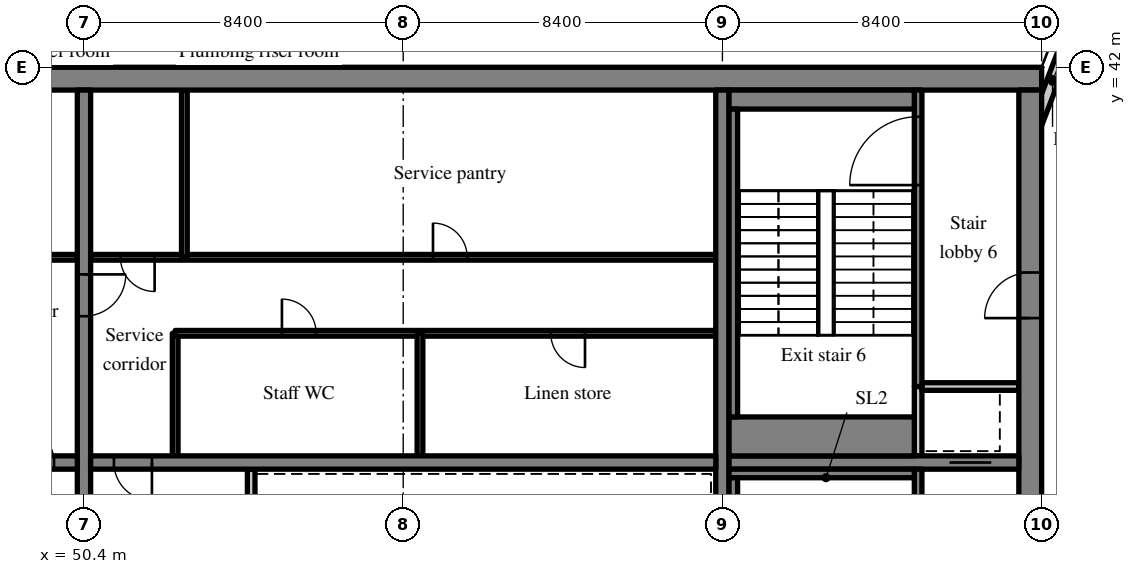
"""IFC4 building model, lengths in metres.
Left out: names, types, materials, properties, quantities, classifications, styles, units other than length and angle.
Written with IfcOpenShell. Run it as: python <this file> out.ifc"""

import sys

from ifc_helpers import new_model, si_unit, direction, frame, frame_2d, origin, place, context, subcontext, project, spatial, rectangle, extrude, source, transform, mapped, element, fill, save


model = new_model("IFC4")
c1 = context("Model", 3, precision=1e-05, world=origin(), true_north=direction((0.0, 1.0)))
c2 = subcontext(c1, "Body", "Model", "MODEL_VIEW")
j1 = project(units=[si_unit("LENGTHUNIT", "METRE"), si_unit("PLANEANGLEUNIT", "RADIAN")], contexts=[c1])
p1 = place(None, origin())
s1 = spatial("IfcSite", under=j1, at=p1, CompositionType="ELEMENT")
p2 = place(p1, origin())
s2 = spatial("IfcBuilding", under=s1, at=p2, CompositionType="ELEMENT")
p3 = place(p2, frame((0.0, 0.0, 249.1)))
s3 = spatial("IfcBuildingStorey", under=s2, at=p3, CompositionType="ELEMENT", Elevation=249.1)
m1 = source(origin(), c2, "Body", "SweptSolid", [
    extrude(rectangle(XDim=50.4, YDim=0.6, at=frame_2d((25.2, 0.0))), origin(), (0.0, 0.0, 1.0), 3.62),
])
p4 = place(p3, frame((25.2, 41.7, 0.0), z_axis=(0.0, 0.0, 1.0), x_axis=(1.0, 0.0, 0.0)))
e1 = element("IfcWall", 1, at=p4, inside=s3, PredefinedType="SHEAR", context=c2, shape_type="MappedRepresentation", body=[
    mapped(m1, transform((0.0, 0.0, 0.0), scale=1.0)),
])
m2 = source(origin(), c2, "Body", "SweptSolid", [
    extrude(rectangle(XDim=18.8, YDim=0.6, at=frame_2d((9.4, 0.0))), origin(), (0.0, 0.0, 1.0), 3.62),
])
p5 = place(p3, frame((75.3, 22.6, 0.0), z_axis=(0.0, 0.0, 1.0), x_axis=(0.0, 1.0, 0.0)))
e2 = element("IfcWall", 2, at=p5, inside=s3, PredefinedType="SHEAR", context=c2, shape_type="MappedRepresentation", body=[
    mapped(m2, transform((0.0, 0.0, 0.0), scale=1.0)),
])
m3 = source(origin(), c2, "Body", "SweptSolid", [
    extrude(rectangle(XDim=1.2, YDim=2.1, at=frame_2d((0.6, 1.05))), frame((0.0, 0.31, 0.0), z_axis=(0.0, -1.0, 0.0), x_axis=(1.0, 0.0, 0.0)), (0.0, 0.0, 1.0), 0.62),
])
p6 = place(p5, frame((12.8, 0.0, 0.0)))
e3 = element("IfcOpeningElement", 3, at=p6, cuts=e2, PredefinedType="OPENING", context=c2, shape_type="MappedRepresentation", body=[
    mapped(m3, transform((0.0, 0.0, 0.0), scale=1.0)),
])
m4 = source(origin(), c2, "Body", "SweptSolid", [
    extrude(rectangle(XDim=18.8, YDim=0.35, at=frame_2d((9.4, 0.0))), origin(), (0.0, 0.0, 1.0), 3.62),
])
p7 = place(p3, frame((50.4, 22.6, 0.0), z_axis=(0.0, 0.0, 1.0), x_axis=(0.0, 1.0, 0.0)))
e4 = element("IfcWall", 4, at=p7, inside=s3, PredefinedType="SHEAR", context=c2, shape_type="MappedRepresentation", body=[
    mapped(m4, transform((0.0, 0.0, 0.0), scale=1.0)),
])
m5 = source(origin(), c2, "Body", "SweptSolid", [
    extrude(rectangle(XDim=1.1, YDim=2.1, at=frame_2d((0.55, 1.05))), frame((0.0, 0.185, 0.0), z_axis=(0.0, -1.0, 0.0), x_axis=(1.0, 0.0, 0.0)), (0.0, 0.0, 1.0), 0.37),
])
p8 = place(p7, frame((12.85, 0.0, 0.0)))
e5 = element("IfcOpeningElement", 5, at=p8, cuts=e4, PredefinedType="OPENING", context=c2, shape_type="MappedRepresentation", body=[
    mapped(m5, transform((0.0, 0.0, 0.0), scale=1.0)),
])
p9 = place(p3, frame((67.2, 22.6, 0.0), z_axis=(0.0, 0.0, 1.0), x_axis=(0.0, 1.0, 0.0)))
e6 = element("IfcWall", 6, at=p9, inside=s3, PredefinedType="SHEAR", context=c2, shape_type="MappedRepresentation", body=[
    mapped(m4, transform((0.0, 0.0, 0.0), scale=1.0)),
])
m6 = source(origin(), c2, "Body", "SweptSolid", [
    extrude(rectangle(XDim=16.45, YDim=0.35, at=frame_2d((8.225, 0.0))), origin(), (0.0, 0.0, 1.0), 3.62),
])
p10 = place(p3, frame((33.775, 31.6, 0.0), z_axis=(0.0, 0.0, 1.0), x_axis=(1.0, 0.0, 0.0)))
e7 = element("IfcWall", 7, at=p10, inside=s3, PredefinedType="SHEAR", context=c2, shape_type="MappedRepresentation", body=[
    mapped(m6, transform((0.0, 0.0, 0.0), scale=1.0)),
])
m7 = source(origin(), c2, "Body", "SweptSolid", [
    extrude(rectangle(XDim=1.0, YDim=2.1, at=frame_2d((0.5, 1.05))), frame((0.0, 0.185, 0.0), z_axis=(0.0, -1.0, 0.0), x_axis=(1.0, 0.0, 0.0)), (0.0, 0.0, 1.0), 0.37),
])
p11 = place(p10, frame((14.837, 0.0, 0.0)))
e8 = element("IfcOpeningElement", 8, at=p11, cuts=e7, PredefinedType="OPENING", context=c2, shape_type="MappedRepresentation", body=[
    mapped(m7, transform((0.0, 0.0, 0.0), scale=1.0)),
])
m8 = source(origin(), c2, "Body", "SweptSolid", [
    extrude(rectangle(XDim=16.45, YDim=0.35, at=frame_2d((8.225, 0.0))), origin(), (0.0, 0.0, 1.0), 3.62),
])
p12 = place(p3, frame((50.575, 31.6, 0.0), z_axis=(0.0, 0.0, 1.0), x_axis=(1.0, 0.0, 0.0)))
e9 = element("IfcWall", 9, at=p12, inside=s3, PredefinedType="SHEAR", context=c2, shape_type="MappedRepresentation", body=[
    mapped(m8, transform((0.0, 0.0, 0.0), scale=1.0)),
])
p13 = place(p12, frame((0.613, 0.0, 0.0)))
e10 = element("IfcOpeningElement", 10, at=p13, cuts=e9, PredefinedType="OPENING", context=c2, shape_type="MappedRepresentation", body=[
    mapped(m7, transform((0.0, 0.0, 0.0), scale=1.0)),
])
m9 = source(origin(), c2, "Body", "SweptSolid", [
    extrude(rectangle(XDim=7.625, YDim=0.35, at=frame_2d((3.812, 0.0))), origin(), (0.0, 0.0, 1.0), 3.62),
])
p14 = place(p3, frame((67.375, 31.6, 0.0), z_axis=(0.0, 0.0, 1.0), x_axis=(1.0, 0.0, 0.0)))
e11 = element("IfcWall", 11, at=p14, inside=s3, PredefinedType="SHEAR", context=c2, shape_type="MappedRepresentation", body=[
    mapped(m9, transform((0.0, 0.0, 0.0), scale=1.0)),
])
p15 = place(p14, frame((5.8, 0.0, 0.0)))
e12 = element("IfcOpeningElement", 12, at=p15, cuts=e11, PredefinedType="OPENING", context=c2, shape_type="MappedRepresentation", body=[
    mapped(m5, transform((0.0, 0.0, 0.0), scale=1.0)),
])
m10 = source(origin(), c2, "Body", "SweptSolid", [
    extrude(rectangle(XDim=3.559, YDim=0.3, at=frame_2d((1.78, 0.0))), origin(), (0.0, 0.0, 1.0), 3.62),
])
p16 = place(p3, frame((76.523, 43.292, 0.0), z_axis=(0.0, 0.0, 1.0), x_axis=(-0.35779745313, -0.933799219604, 0.0)))
e13 = element("IfcWall", 13, at=p16, inside=s3, PredefinedType="SOLIDWALL", context=c2, shape_type="MappedRepresentation", body=[
    mapped(m10, transform((0.0, 0.0, 0.0), scale=1.0)),
])
m11 = source(origin(), c2, "Body", "SweptSolid", [
    extrude(rectangle(XDim=1.5, YDim=2.0, at=frame_2d((0.75, 1.0))), frame((0.0, 0.16, 0.0), z_axis=(0.0, -1.0, 0.0), x_axis=(1.0, 0.0, 0.0)), (0.0, 0.0, 1.0), 0.32),
])
p17 = place(p16, frame((0.156, 0.0, 0.9)))
e14 = element("IfcOpeningElement", 14, at=p17, cuts=e13, PredefinedType="OPENING", context=c2, shape_type="MappedRepresentation", body=[
    mapped(m11, transform((0.0, 0.0, 0.0), scale=1.0)),
])
m12 = source(origin(), c2, "Body", "SweptSolid", [
    extrude(rectangle(XDim=16.45, YDim=0.15, at=frame_2d((8.225, 0.0))), origin(), (0.0, 0.0, 1.0), 3.62),
])
p18 = place(p3, frame((33.775, 37.0, 0.0), z_axis=(0.0, 0.0, 1.0), x_axis=(1.0, 0.0, 0.0)))
e15 = element("IfcWall", 15, at=p18, inside=s3, PredefinedType="PARTITIONING", context=c2, shape_type="MappedRepresentation", body=[
    mapped(m12, transform((0.0, 0.0, 0.0), scale=1.0)),
])
m13 = source(origin(), c2, "Body", "SweptSolid", [
    extrude(rectangle(XDim=0.9, YDim=2.1, at=frame_2d((0.45, 1.05))), frame((0.0, 0.085, 0.0), z_axis=(0.0, -1.0, 0.0), x_axis=(1.0, 0.0, 0.0)), (0.0, 0.0, 1.0), 0.17),
])
p19 = place(p18, frame((0.784, 0.0, 0.0)))
e16 = element("IfcOpeningElement", 16, at=p19, cuts=e15, PredefinedType="OPENING", context=c2, shape_type="MappedRepresentation", body=[
    mapped(m13, transform((0.0, 0.0, 0.0), scale=1.0)),
])
p20 = place(p18, frame((3.663, 0.0, 0.0)))
e17 = element("IfcOpeningElement", 17, at=p20, cuts=e15, PredefinedType="OPENING", context=c2, shape_type="MappedRepresentation", body=[
    mapped(m13, transform((0.0, 0.0, 0.0), scale=1.0)),
])
p21 = place(p18, frame((9.42, 0.0, 0.0)))
e18 = element("IfcOpeningElement", 18, at=p21, cuts=e15, PredefinedType="OPENING", context=c2, shape_type="MappedRepresentation", body=[
    mapped(m13, transform((0.0, 0.0, 0.0), scale=1.0)),
])
p22 = place(p18, frame((14.766, 0.0, 0.0)))
e19 = element("IfcOpeningElement", 19, at=p22, cuts=e15, PredefinedType="OPENING", context=c2, shape_type="MappedRepresentation", body=[
    mapped(m13, transform((0.0, 0.0, 0.0), scale=1.0)),
])
m14 = source(origin(), c2, "Body", "SweptSolid", [
    extrude(rectangle(XDim=2.625, YDim=0.2, at=frame_2d((1.312, 0.0))), origin(), (0.0, 0.0, 1.0), 3.62),
])
p23 = place(p3, frame((54.8, 28.8, 0.0), z_axis=(0.0, 0.0, 1.0), x_axis=(0.0, 1.0, 0.0)))
e20 = element("IfcWall", 20, at=p23, inside=s3, PredefinedType="SOLIDWALL", context=c2, shape_type="MappedRepresentation", body=[
    mapped(m14, transform((0.0, 0.0, 0.0), scale=1.0)),
])
m15 = source(origin(), c2, "Body", "SweptSolid", [
    extrude(rectangle(XDim=3.225, YDim=0.15, at=frame_2d((1.613, 0.0))), origin(), (0.0, 0.0, 1.0), 3.62),
])
p24 = place(p3, frame((52.8, 31.775, 0.0), z_axis=(0.0, 0.0, 1.0), x_axis=(0.0, 1.0, 0.0)))
e21 = element("IfcWall", 21, at=p24, inside=s3, PredefinedType="PARTITIONING", context=c2, shape_type="MappedRepresentation", body=[
    mapped(m15, transform((0.0, 0.0, 0.0), scale=1.0)),
])
m16 = source(origin(), c2, "Body", "SweptSolid", [
    extrude(rectangle(XDim=14.225, YDim=0.15, at=frame_2d((7.112, 0.0))), origin(), (0.0, 0.0, 1.0), 3.62),
])
p25 = place(p3, frame((67.025, 35.0, 0.0), z_axis=(0.0, 0.0, 1.0), x_axis=(-1.0, 0.0, 0.0)))
e22 = element("IfcWall", 22, at=p25, inside=s3, PredefinedType="PARTITIONING", context=c2, shape_type="MappedRepresentation", body=[
    mapped(m16, transform((0.0, 0.0, 0.0), scale=1.0)),
])
p26 = place(p25, frame((3.441, 0.0, 0.0)))
e23 = element("IfcOpeningElement", 23, at=p26, cuts=e22, PredefinedType="OPENING", context=c2, shape_type="MappedRepresentation", body=[
    mapped(m13, transform((0.0, 0.0, 0.0), scale=1.0)),
])
p27 = place(p25, frame((10.516, 0.0, 0.0)))
e24 = element("IfcOpeningElement", 24, at=p27, cuts=e22, PredefinedType="OPENING", context=c2, shape_type="MappedRepresentation", body=[
    mapped(m13, transform((0.0, 0.0, 0.0), scale=1.0)),
])
m17 = source(origin(), c2, "Body", "SweptSolid", [
    extrude(rectangle(XDim=16.45, YDim=0.15, at=frame_2d((8.225, 0.0))), origin(), (0.0, 0.0, 1.0), 3.62),
])
p28 = place(p3, frame((67.025, 37.0, 0.0), z_axis=(0.0, 0.0, 1.0), x_axis=(-1.0, 0.0, 0.0)))
e25 = element("IfcWall", 25, at=p28, inside=s3, PredefinedType="PARTITIONING", context=c2, shape_type="MappedRepresentation", body=[
    mapped(m17, transform((0.0, 0.0, 0.0), scale=1.0)),
])
p29 = place(p28, frame((6.541, 0.0, 0.0)))
e26 = element("IfcOpeningElement", 26, at=p29, cuts=e25, PredefinedType="OPENING", context=c2, shape_type="MappedRepresentation", body=[
    mapped(m13, transform((0.0, 0.0, 0.0), scale=1.0)),
])
p30 = place(p28, frame((14.766, 0.0, 0.0)))
e27 = element("IfcOpeningElement", 27, at=p30, cuts=e25, PredefinedType="OPENING", context=c2, shape_type="MappedRepresentation", body=[
    mapped(m13, transform((0.0, 0.0, 0.0), scale=1.0)),
])
p31 = place(p3, frame((59.242, 31.775, 0.0), z_axis=(0.0, 0.0, 1.0), x_axis=(0.0, 1.0, 0.0)))
e28 = element("IfcWall", 28, at=p31, inside=s3, PredefinedType="PARTITIONING", context=c2, shape_type="MappedRepresentation", body=[
    mapped(m15, transform((0.0, 0.0, 0.0), scale=1.0)),
])
m18 = source(origin(), c2, "Body", "SweptSolid", [
    extrude(rectangle(XDim=4.4, YDim=0.15, at=frame_2d((2.2, 0.0))), origin(), (0.0, 0.0, 1.0), 3.62),
])
p32 = place(p3, frame((53.042, 37.0, 0.0), z_axis=(0.0, 0.0, 1.0), x_axis=(0.0, 1.0, 0.0)))
e29 = element("IfcWall", 29, at=p32, inside=s3, PredefinedType="PARTITIONING", context=c2, shape_type="MappedRepresentation", body=[
    mapped(m18, transform((0.0, 0.0, 0.0), scale=1.0)),
])
m19 = source(origin(), c2, "Body", "SweptSolid", [
    extrude(rectangle(XDim=8.825, YDim=0.2, at=frame_2d((4.413, 0.0))), origin(), (0.0, 0.0, 1.0), 3.62),
])
p33 = place(p3, frame((72.35, 22.6, 0.0), z_axis=(0.0, 0.0, 1.0), x_axis=(0.0, 1.0, 0.0)))
e30 = element("IfcWall", 30, at=p33, inside=s3, PredefinedType="SOLIDWALL", context=c2, shape_type="MappedRepresentation", body=[
    mapped(m19, transform((0.0, 0.0, 0.0), scale=1.0)),
])
m20 = source(origin(), c2, "Body", "SweptSolid", [
    extrude(rectangle(XDim=1.2, YDim=2.1, at=frame_2d((0.6, 1.05))), frame((0.0, 0.11, 0.0), z_axis=(0.0, -1.0, 0.0), x_axis=(1.0, 0.0, 0.0)), (0.0, 0.0, 1.0), 0.22),
])
p34 = place(p33, frame((6.9, 0.0, 0.0)))
e31 = element("IfcOpeningElement", 31, at=p34, cuts=e30, PredefinedType="OPENING", context=c2, shape_type="MappedRepresentation", body=[
    mapped(m20, transform((0.0, 0.0, 0.0), scale=1.0)),
])
m21 = source(origin(), c2, "Body", "SweptSolid", [
    extrude(rectangle(XDim=1.825, YDim=0.2, at=frame_2d((0.913, 0.0))), origin(), (0.0, 0.0, 1.0), 3.62),
])
p35 = place(p3, frame((72.35, 31.775, 0.0), z_axis=(0.0, 0.0, 1.0), x_axis=(0.0, 1.0, 0.0)))
e32 = element("IfcWall", 32, at=p35, inside=s3, PredefinedType="SOLIDWALL", context=c2, shape_type="MappedRepresentation", body=[
    mapped(m21, transform((0.0, 0.0, 0.0), scale=1.0)),
])
m22 = source(origin(), c2, "Body", "SweptSolid", [
    extrude(rectangle(XDim=2.55, YDim=0.2, at=frame_2d((1.275, 0.0))), origin(), (0.0, 0.0, 1.0), 3.62),
])
p36 = place(p3, frame((72.45, 33.6, 0.0), z_axis=(0.0, 0.0, 1.0), x_axis=(1.0, 0.0, 0.0)))
e33 = element("IfcWall", 33, at=p36, inside=s3, PredefinedType="SOLIDWALL", context=c2, shape_type="MappedRepresentation", body=[
    mapped(m22, transform((0.0, 0.0, 0.0), scale=1.0)),
])
m23 = source(origin(), c2, "Body", "SweptSolid", [
    extrude(rectangle(XDim=7.8, YDim=0.2, at=frame_2d((3.9, 0.0))), origin(), (0.0, 0.0, 1.0), 3.62),
])
p37 = place(p3, frame((72.35, 33.6, 0.0), z_axis=(0.0, 0.0, 1.0), x_axis=(0.0, 1.0, 0.0)))
e34 = element("IfcWall", 34, at=p37, inside=s3, PredefinedType="SOLIDWALL", context=c2, shape_type="MappedRepresentation", body=[
    mapped(m23, transform((0.0, 0.0, 0.0), scale=1.0)),
])
m24 = source(origin(), c2, "Body", "SweptSolid", [
    extrude(rectangle(XDim=1.8, YDim=2.1, at=frame_2d((0.9, 1.05))), frame((0.0, 0.11, 0.0), z_axis=(0.0, -1.0, 0.0), x_axis=(1.0, 0.0, 0.0)), (0.0, 0.0, 1.0), 0.22),
])
p38 = place(p37, frame((5.3, 0.0, 0.0)))
e35 = element("IfcOpeningElement", 35, at=p38, cuts=e34, PredefinedType="OPENING", context=c2, shape_type="MappedRepresentation", body=[
    mapped(m24, transform((0.0, 0.0, 0.0), scale=1.0)),
])
m25 = source(origin(), c2, "Body", "SweptSolid", [
    extrude(rectangle(XDim=4.875, YDim=0.225, at=frame_2d((2.438, 0.0))), origin(), (0.0, 0.0, 1.0), 3.62),
])
p39 = place(p3, frame((67.375, 31.312, 0.0), z_axis=(0.0, 0.0, 1.0), x_axis=(1.0, 0.0, 0.0)))
e36 = element("IfcWall", 36, at=p39, inside=s3, PredefinedType="SOLIDWALL", context=c2, shape_type="MappedRepresentation", body=[
    mapped(m25, transform((0.0, 0.0, 0.0), scale=1.0)),
])
m26 = source(origin(), c2, "Body", "SweptSolid", [
    extrude(rectangle(XDim=8.1, YDim=0.225, at=frame_2d((4.05, 0.0))), origin(), (0.0, 0.0, 1.0), 3.62),
])
p40 = place(p3, frame((67.487, 23.1, 0.0), z_axis=(0.0, 0.0, 1.0), x_axis=(0.0, 1.0, 0.0)))
e37 = element("IfcWall", 37, at=p40, inside=s3, PredefinedType="SOLIDWALL", context=c2, shape_type="MappedRepresentation", body=[
    mapped(m26, transform((0.0, 0.0, 0.0), scale=1.0)),
])
m27 = source(origin(), c2, "Body", "SweptSolid", [
    extrude(rectangle(XDim=4.875, YDim=0.5, at=frame_2d((2.438, 0.0))), origin(), (0.0, 0.0, 1.0), 3.62),
])
p41 = place(p3, frame((67.375, 41.15, 0.0), z_axis=(0.0, 0.0, 1.0), x_axis=(1.0, 0.0, 0.0)))
e38 = element("IfcWall", 38, at=p41, inside=s3, PredefinedType="SOLIDWALL", context=c2, shape_type="MappedRepresentation", body=[
    mapped(m27, transform((0.0, 0.0, 0.0), scale=1.0)),
])
m28 = source(origin(), c2, "Body", "SweptSolid", [
    extrude(rectangle(XDim=4.875, YDim=1.025, at=frame_2d((2.438, 0.0))), origin(), (0.0, 0.0, 1.0), 3.62),
])
p42 = place(p3, frame((67.375, 32.287, 0.0), z_axis=(0.0, 0.0, 1.0), x_axis=(1.0, 0.0, 0.0)))
e39 = element("IfcWall", 39, at=p42, inside=s3, PredefinedType="SOLIDWALL", context=c2, shape_type="MappedRepresentation", body=[
    mapped(m28, transform((0.0, 0.0, 0.0), scale=1.0)),
])
p43 = place(p3, frame((67.487, 32.8, 0.0), z_axis=(0.0, 0.0, 1.0), x_axis=(0.0, 1.0, 0.0)))
e40 = element("IfcWall", 40, at=p43, inside=s3, PredefinedType="SOLIDWALL", context=c2, shape_type="MappedRepresentation", body=[
    mapped(m26, transform((0.0, 0.0, 0.0), scale=1.0)),
])
m29 = source(origin(), c2, "Body", "SweptSolid", [
    extrude(rectangle(XDim=1.5, YDim=2.0, at=frame_2d((0.75, 1.0))), frame((0.0, 0.03, 0.0), z_axis=(0.0, -1.0, 0.0), x_axis=(1.0, 0.0, 0.0)), (0.0, 0.0, 1.0), 0.06),
])
p44 = place(p17, origin())
e41 = element("IfcWindow", 41, at=p44, inside=s3, PartitioningType="SINGLE_PANEL", PredefinedType="WINDOW", context=c2, shape_type="MappedRepresentation", body=[
    mapped(m29, transform((0.0, 0.0, 0.0), scale=1.0)),
])
fill(e14, e41)
m30 = source(origin(), c2, "Body", "SweptSolid", [
    extrude(rectangle(XDim=1.0, YDim=2.1, at=frame_2d((0.5, 1.05))), frame((0.0, 0.025, 0.0), z_axis=(0.0, -1.0, 0.0), x_axis=(1.0, 0.0, 0.0)), (0.0, 0.0, 1.0), 0.05),
])
p45 = place(p11, origin())
e42 = element("IfcDoor", 42, at=p45, inside=s3, OperationType="SINGLE_SWING_LEFT", PredefinedType="DOOR", context=c2, shape_type="MappedRepresentation", body=[
    mapped(m30, transform((0.0, 0.0, 0.0), scale=1.0)),
])
fill(e8, e42)
p46 = place(p13, origin())
e43 = element("IfcDoor", 43, at=p46, inside=s3, OperationType="SINGLE_SWING_RIGHT", PredefinedType="DOOR", context=c2, shape_type="MappedRepresentation", body=[
    mapped(m30, transform((0.0, 0.0, 0.0), scale=1.0)),
])
fill(e10, e43)
m31 = source(origin(), c2, "Body", "SweptSolid", [
    extrude(rectangle(XDim=0.9, YDim=2.1, at=frame_2d((0.45, 1.05))), frame((0.0, 0.025, 0.0), z_axis=(0.0, -1.0, 0.0), x_axis=(1.0, 0.0, 0.0)), (0.0, 0.0, 1.0), 0.05),
])
p47 = place(p26, origin())
e44 = element("IfcDoor", 44, at=p47, inside=s3, OperationType="SINGLE_SWING_LEFT", PredefinedType="DOOR", context=c2, shape_type="MappedRepresentation", body=[
    mapped(m31, transform((0.0, 0.0, 0.0), scale=1.0)),
])
fill(e23, e44)
p48 = place(p27, origin())
e45 = element("IfcDoor", 45, at=p48, inside=s3, OperationType="SINGLE_SWING_RIGHT", PredefinedType="DOOR", context=c2, shape_type="MappedRepresentation", body=[
    mapped(m31, transform((0.0, 0.0, 0.0), scale=1.0)),
])
fill(e24, e45)
p49 = place(p29, origin())
e46 = element("IfcDoor", 46, at=p49, inside=s3, OperationType="SINGLE_SWING_RIGHT", PredefinedType="DOOR", context=c2, shape_type="MappedRepresentation", body=[
    mapped(m31, transform((0.0, 0.0, 0.0), scale=1.0)),
])
fill(e26, e46)
p50 = place(p30, origin())
e47 = element("IfcDoor", 47, at=p50, inside=s3, OperationType="SINGLE_SWING_LEFT", PredefinedType="DOOR", context=c2, shape_type="MappedRepresentation", body=[
    mapped(m31, transform((0.0, 0.0, 0.0), scale=1.0)),
])
fill(e27, e47)
m32 = source(origin(), c2, "Body", "SweptSolid", [
    extrude(rectangle(XDim=1.1, YDim=2.1, at=frame_2d((0.55, 1.05))), frame((0.0, 0.025, 0.0), z_axis=(0.0, -1.0, 0.0), x_axis=(1.0, 0.0, 0.0)), (0.0, 0.0, 1.0), 0.05),
])
p51 = place(p15, origin())
e48 = element("IfcDoor", 48, at=p51, inside=s3, OperationType="SLIDING_TO_RIGHT", PredefinedType="DOOR", context=c2, shape_type="MappedRepresentation", body=[
    mapped(m32, transform((0.0, 0.0, 0.0), scale=1.0)),
])
fill(e12, e48)
m33 = source(origin(), c2, "Body", "SweptSolid", [
    extrude(rectangle(XDim=1.8, YDim=2.1, at=frame_2d((0.9, 1.05))), frame((0.0, 0.025, 0.0), z_axis=(0.0, -1.0, 0.0), x_axis=(1.0, 0.0, 0.0)), (0.0, 0.0, 1.0), 0.05),
])
p52 = place(p38, origin())
e49 = element("IfcDoor", 49, at=p52, inside=s3, OperationType="SINGLE_SWING_LEFT", PredefinedType="DOOR", context=c2, shape_type="MappedRepresentation", body=[
    mapped(m33, transform((0.0, 0.0, 0.0), scale=1.0)),
])
fill(e35, e49)
m34 = source(origin(), c2, "Body", "SweptSolid", [
    extrude(rectangle(XDim=1.2, YDim=2.1, at=frame_2d((0.6, 1.05))), frame((0.0, 0.025, 0.0), z_axis=(0.0, -1.0, 0.0), x_axis=(1.0, 0.0, 0.0)), (0.0, 0.0, 1.0), 0.05),
])
p53 = place(p6, origin())
e50 = element("IfcDoor", 50, at=p53, inside=s3, OperationType="SINGLE_SWING_LEFT", PredefinedType="DOOR", context=c2, shape_type="MappedRepresentation", body=[
    mapped(m34, transform((0.0, 0.0, 0.0), scale=1.0)),
])
fill(e3, e50)
p54 = place(p8, origin())
e51 = element("IfcDoor", 51, at=p54, inside=s3, OperationType="SINGLE_SWING_RIGHT", PredefinedType="DOOR", context=c2, shape_type="MappedRepresentation", body=[
    mapped(m32, transform((0.0, 0.0, 0.0), scale=1.0)),
])
fill(e5, e51)
save(model, sys.argv[1])
